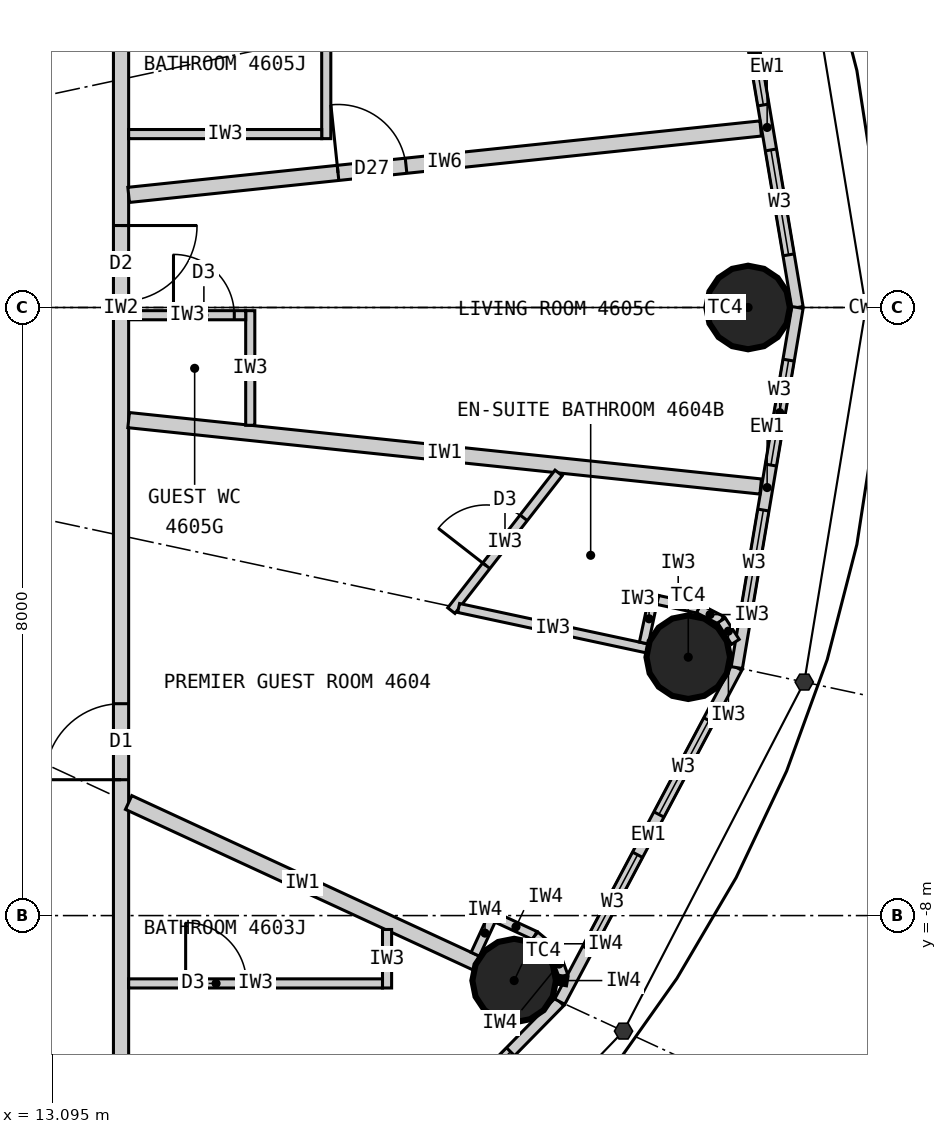
"""IFC4 building model, lengths in metres.
Left out: names, types, materials, properties, quantities, classifications, styles, units other than length and angle.
Written with IfcOpenShell. Run it as: python <this file> out.ifc"""

import sys

from ifc_helpers import new_model, si_unit, direction, frame, frame_2d, origin, origin_2d, place, context, subcontext, project, spatial, rectangle, circle, extrude, element, fill, save


model = new_model("IFC4")
c1 = context("Model", 3, precision=1e-05, world=origin(), true_north=direction((0.0, 1.0)))
c2 = subcontext(c1, "Body", "Model", "MODEL_VIEW")
j1 = project(units=[si_unit("LENGTHUNIT", "METRE"), si_unit("PLANEANGLEUNIT", "RADIAN")], contexts=[c1])
p1 = place(None, origin())
s1 = spatial("IfcSite", under=j1, at=p1, CompositionType="ELEMENT")
p2 = place(p1, origin())
s2 = spatial("IfcBuilding", under=s1, at=p2, CompositionType="ELEMENT")
p3 = place(p2, frame((0.0, 0.0, 173.1)))
s3 = spatial("IfcBuildingStorey", under=s2, at=p3, CompositionType="ELEMENT", Elevation=173.1)
for number, where, z_axis, x_axis in (
    (1, (22.25, 0.0, 0.0), (0.0, 0.0, 1.0), (1.0, 0.0, 0.0)),
    (2, (19.172, -8.855, 0.0), (0.0, 0.0, 1.0), (1.0, 0.0, 0.0)),
    (3, (21.463, -4.601, 0.0), (0.0, 0.0, 1.0), (1.0, 0.0, 0.0)),
):
    element("IfcColumn", number, at=place(p3, frame(where, z_axis=z_axis, x_axis=x_axis)), inside=s3, PredefinedType="COLUMN", context=c2, shape_type="SweptSolid", body=[
        extrude(circle(Radius=0.55, at=origin_2d()), origin(), (0.0, 0.0, 1.0), 3.3),
    ])
p4 = place(p3, frame((22.9, 0.0, 0.0), z_axis=(0.0, 0.0, 1.0), x_axis=(-0.166162111254, 0.986098449843, 0.0)))
e4 = element("IfcWall", 4, at=p4, inside=s3, PredefinedType="ELEMENTEDWALL", context=c2, shape_type="SweptSolid", body=[
    extrude(rectangle(XDim=4.805, YDim=0.15, at=frame_2d((2.402, 0.0))), origin(), (0.0, 0.0, 1.0), 3.12),
])
p5 = place(p4, frame((0.702, 0.0, 0.9)))
e5 = element("IfcOpeningElement", 5, at=p5, cuts=e4, PredefinedType="OPENING", context=c2, shape_type="SweptSolid", body=[
    extrude(rectangle(XDim=1.4, YDim=1.9, at=frame_2d((0.7, 0.95))), frame((0.0, 0.085, 0.0), z_axis=(0.0, -1.0, 0.0), x_axis=(1.0, 0.0, 0.0)), (0.0, 0.0, 1.0), 0.17),
])
p6 = place(p4, frame((2.702, 0.0, 0.9)))
e6 = element("IfcOpeningElement", 6, at=p6, cuts=e4, PredefinedType="OPENING", context=c2, shape_type="SweptSolid", body=[
    extrude(rectangle(XDim=1.4, YDim=1.9, at=frame_2d((0.7, 0.95))), frame((0.0, 0.085, 0.0), z_axis=(0.0, -1.0, 0.0), x_axis=(1.0, 0.0, 0.0)), (0.0, 0.0, 1.0), 0.17),
])
p7 = place(p3, frame((16.095, -12.876, 0.0), z_axis=(0.0, 0.0, 1.0), x_axis=(0.700727467776, 0.71342905457, 0.0)))
e7 = element("IfcWall", 7, at=p7, inside=s3, PredefinedType="ELEMENTEDWALL", context=c2, shape_type="SweptSolid", body=[
    extrude(rectangle(XDim=5.247, YDim=0.15, at=frame_2d((2.624, 0.0))), origin(), (0.0, 0.0, 1.0), 3.12),
])
p8 = place(p7, frame((0.924, 0.0, 0.9)))
e8 = element("IfcOpeningElement", 8, at=p8, cuts=e7, PredefinedType="OPENING", context=c2, shape_type="SweptSolid", body=[
    extrude(rectangle(XDim=1.4, YDim=1.9, at=frame_2d((0.7, 0.95))), frame((0.0, 0.085, 0.0), z_axis=(0.0, -1.0, 0.0), x_axis=(1.0, 0.0, 0.0)), (0.0, 0.0, 1.0), 0.17),
])
p9 = place(p7, frame((2.924, 0.0, 0.9)))
e9 = element("IfcOpeningElement", 9, at=p9, cuts=e7, PredefinedType="OPENING", context=c2, shape_type="SweptSolid", body=[
    extrude(rectangle(XDim=1.4, YDim=1.9, at=frame_2d((0.7, 0.95))), frame((0.0, 0.085, 0.0), z_axis=(0.0, -1.0, 0.0), x_axis=(1.0, 0.0, 0.0)), (0.0, 0.0, 1.0), 0.17),
])
p10 = place(p3, frame((19.772, -9.132, 0.0), z_axis=(0.0, 0.0, 1.0), x_axis=(0.468428906714, 0.883501193748, 0.0)))
e10 = element("IfcWall", 10, at=p10, inside=s3, PredefinedType="ELEMENTEDWALL", context=c2, shape_type="SweptSolid", body=[
    extrude(rectangle(XDim=4.974, YDim=0.15, at=frame_2d((2.487, 0.0))), origin(), (0.0, 0.0, 1.0), 3.12),
])
p11 = place(p10, frame((0.787, 0.0, 0.9)))
e11 = element("IfcOpeningElement", 11, at=p11, cuts=e10, PredefinedType="OPENING", context=c2, shape_type="SweptSolid", body=[
    extrude(rectangle(XDim=1.4, YDim=1.9, at=frame_2d((0.7, 0.95))), frame((0.0, 0.085, 0.0), z_axis=(0.0, -1.0, 0.0), x_axis=(1.0, 0.0, 0.0)), (0.0, 0.0, 1.0), 0.17),
])
p12 = place(p10, frame((2.787, 0.0, 0.9)))
e12 = element("IfcOpeningElement", 12, at=p12, cuts=e10, PredefinedType="OPENING", context=c2, shape_type="SweptSolid", body=[
    extrude(rectangle(XDim=1.4, YDim=1.9, at=frame_2d((0.7, 0.95))), frame((0.0, 0.085, 0.0), z_axis=(0.0, -1.0, 0.0), x_axis=(1.0, 0.0, 0.0)), (0.0, 0.0, 1.0), 0.17),
])
p13 = place(p3, frame((22.102, -4.738, 0.0), z_axis=(0.0, 0.0, 1.0), x_axis=(0.166162111254, 0.986098449843, 0.0)))
e13 = element("IfcWall", 13, at=p13, inside=s3, PredefinedType="ELEMENTEDWALL", context=c2, shape_type="SweptSolid", body=[
    extrude(rectangle(XDim=4.805, YDim=0.15, at=frame_2d((2.402, 0.0))), origin(), (0.0, 0.0, 1.0), 3.12),
])
p14 = place(p13, frame((0.702, 0.0, 0.9)))
e14 = element("IfcOpeningElement", 14, at=p14, cuts=e13, PredefinedType="OPENING", context=c2, shape_type="SweptSolid", body=[
    extrude(rectangle(XDim=1.4, YDim=1.9, at=frame_2d((0.7, 0.95))), frame((0.0, 0.085, 0.0), z_axis=(0.0, -1.0, 0.0), x_axis=(1.0, 0.0, 0.0)), (0.0, 0.0, 1.0), 0.17),
])
p15 = place(p13, frame((2.702, 0.0, 0.9)))
e15 = element("IfcOpeningElement", 15, at=p15, cuts=e13, PredefinedType="OPENING", context=c2, shape_type="SweptSolid", body=[
    extrude(rectangle(XDim=1.4, YDim=1.9, at=frame_2d((0.7, 0.95))), frame((0.0, 0.085, 0.0), z_axis=(0.0, -1.0, 0.0), x_axis=(1.0, 0.0, 0.0)), (0.0, 0.0, 1.0), 0.17),
])
p16 = place(p3, frame((14.0, -9.9, 0.0), z_axis=(0.0, 0.0, 1.0), x_axis=(0.0, 1.0, 0.0)))
e16 = element("IfcWall", 16, at=p16, inside=s3, PredefinedType="PARTITIONING", context=c2, shape_type="SweptSolid", body=[
    extrude(rectangle(XDim=19.8, YDim=0.2, at=frame_2d((9.9, 0.0))), origin(), (0.0, 0.0, 1.0), 3.12),
])
p17 = place(p16, frame((3.688, 0.0, 0.0)))
e17 = element("IfcOpeningElement", 17, at=p17, cuts=e16, PredefinedType="OPENING", context=c2, shape_type="SweptSolid", body=[
    extrude(rectangle(XDim=1.0, YDim=2.2, at=frame_2d((0.5, 1.1))), frame((0.0, 0.11, 0.0), z_axis=(0.0, -1.0, 0.0), x_axis=(1.0, 0.0, 0.0)), (0.0, 0.0, 1.0), 0.22),
])
p18 = place(p16, frame((9.979, 0.0, 0.0)))
e18 = element("IfcOpeningElement", 18, at=p18, cuts=e16, PredefinedType="OPENING", context=c2, shape_type="SweptSolid", body=[
    extrude(rectangle(XDim=1.0, YDim=2.2, at=frame_2d((0.5, 1.1))), frame((0.0, 0.11, 0.0), z_axis=(0.0, -1.0, 0.0), x_axis=(1.0, 0.0, 0.0)), (0.0, 0.0, 1.0), 0.22),
])
p19 = place(p16, frame((17.122, 0.0, 0.0)))
e19 = element("IfcOpeningElement", 19, at=p19, cuts=e16, PredefinedType="OPENING", context=c2, shape_type="SweptSolid", body=[
    extrude(rectangle(XDim=1.0, YDim=2.2, at=frame_2d((0.5, 1.1))), frame((0.0, 0.11, 0.0), z_axis=(0.0, -1.0, 0.0), x_axis=(1.0, 0.0, 0.0)), (0.0, 0.0, 1.0), 0.22),
])
p20 = place(p3, frame((14.1, 1.481, 0.0), z_axis=(0.0, 0.0, 1.0), x_axis=(0.994524794819, 0.104500873159, 0.0)))
e20 = element("IfcWall", 20, at=p20, inside=s3, PredefinedType="PARTITIONING", context=c2, shape_type="SweptSolid", body=[
    extrude(rectangle(XDim=8.362, YDim=0.2, at=frame_2d((4.181, 0.0))), origin(), (0.0, 0.0, 1.0), 2.47),
])
p21 = place(p20, frame((2.77, 0.0, 0.0)))
e21 = element("IfcOpeningElement", 21, at=p21, cuts=e20, PredefinedType="OPENING", context=c2, shape_type="SweptSolid", body=[
    extrude(rectangle(XDim=0.9, YDim=2.1, at=frame_2d((0.45, 1.05))), frame((0.0, 0.11, 0.0), z_axis=(0.0, -1.0, 0.0), x_axis=(1.0, 0.0, 0.0)), (0.0, 0.0, 1.0), 0.22),
])
p22 = place(p3, frame((14.1, -6.512, 0.0), z_axis=(0.0, 0.0, 1.0), x_axis=(0.907823150669, -0.419353224751, 0.0)))
e22 = element("IfcWall", 22, at=p22, inside=s3, PredefinedType="PARTITIONING", context=c2, shape_type="SweptSolid", body=[
    extrude(rectangle(XDim=5.037, YDim=0.2, at=frame_2d((2.519, 0.0))), origin(), (0.0, 0.0, 1.0), 2.32),
])
p23 = place(p3, frame((14.1, -1.481, 0.0), z_axis=(0.0, 0.0, 1.0), x_axis=(0.994524794819, -0.104500873159, 0.0)))
e23 = element("IfcWall", 23, at=p23, inside=s3, PredefinedType="PARTITIONING", context=c2, shape_type="SweptSolid", body=[
    extrude(rectangle(XDim=8.362, YDim=0.2, at=frame_2d((4.181, 0.0))), origin(), (0.0, 0.0, 1.0), 2.47),
])
p24 = place(p3, frame((17.5, -8.183, 0.0), z_axis=(0.0, 0.0, 1.0), x_axis=(0.0, -1.0, 0.0)))
e24 = element("IfcWall", 24, at=p24, inside=s3, PredefinedType="PARTITIONING", context=c2, shape_type="SweptSolid", body=[
    extrude(rectangle(XDim=0.77, YDim=0.12, at=frame_2d((0.385, 0.0))), origin(), (0.0, 0.0, 1.0), 3.12),
])
p25 = place(p3, frame((14.1, -8.893, 0.0), z_axis=(0.0, 0.0, 1.0), x_axis=(1.0, 0.0, 0.0)))
e25 = element("IfcWall", 25, at=p25, inside=s3, PredefinedType="PARTITIONING", context=c2, shape_type="SweptSolid", body=[
    extrude(rectangle(XDim=3.34, YDim=0.12, at=frame_2d((1.67, 0.0))), origin(), (0.0, 0.0, 1.0), 3.12),
])
p26 = place(p25, frame((0.75, 0.0, 0.0)))
e26 = element("IfcOpeningElement", 26, at=p26, cuts=e25, PredefinedType="OPENING", context=c2, shape_type="SweptSolid", body=[
    extrude(rectangle(XDim=0.8, YDim=2.1, at=frame_2d((0.4, 1.05))), frame((0.0, 0.07, 0.0), z_axis=(0.0, -1.0, 0.0), x_axis=(1.0, 0.0, 0.0)), (0.0, 0.0, 1.0), 0.14),
])
p27 = place(p3, frame((19.758, -2.177, 0.0), z_axis=(0.0, 0.0, 1.0), x_axis=(-0.614713147302, -0.788750750576, 0.0)))
e27 = element("IfcWall", 27, at=p27, inside=s3, PredefinedType="PARTITIONING", context=c2, shape_type="SweptSolid", body=[
    extrude(rectangle(XDim=2.296, YDim=0.12, at=frame_2d((1.148, 0.0))), origin(), (0.0, 0.0, 1.0), 3.12),
])
p28 = place(p27, frame((0.748, 0.0, 0.0)))
e28 = element("IfcOpeningElement", 28, at=p28, cuts=e27, PredefinedType="OPENING", context=c2, shape_type="SweptSolid", body=[
    extrude(rectangle(XDim=0.8, YDim=2.1, at=frame_2d((0.4, 1.05))), frame((0.0, 0.07, 0.0), z_axis=(0.0, -1.0, 0.0), x_axis=(1.0, 0.0, 0.0)), (0.0, 0.0, 1.0), 0.14),
])
p29 = place(p3, frame((18.441, -3.953, 0.0), z_axis=(0.0, 0.0, 1.0), x_axis=(0.977801007461, -0.209535652833, 0.0)))
e29 = element("IfcWall", 29, at=p29, inside=s3, PredefinedType="PARTITIONING", context=c2, shape_type="SweptSolid", body=[
    extrude(rectangle(XDim=2.54, YDim=0.12, at=frame_2d((1.27, 0.0))), origin(), (0.0, 0.0, 1.0), 2.42),
])
p30 = place(p3, frame((20.879, -4.414, 0.0), z_axis=(0.0, 0.0, 1.0), x_axis=(0.209554644104, 0.977796937577, 0.0)))
e30 = element("IfcWall", 30, at=p30, inside=s3, PredefinedType="PARTITIONING", context=c2, shape_type="SweptSolid", body=[
    extrude(rectangle(XDim=0.652, YDim=0.12, at=frame_2d((0.326, 0.0))), origin(), (0.0, 0.0, 1.0), 3.12),
])
p31 = place(p3, frame((21.062, -3.848, 0.0), z_axis=(0.0, 0.0, 1.0), x_axis=(0.977789415726, -0.209589738521, 0.0)))
e31 = element("IfcWall", 31, at=p31, inside=s3, PredefinedType="PARTITIONING", context=c2, shape_type="SweptSolid", body=[
    extrude(rectangle(XDim=0.55, YDim=0.12, at=frame_2d((0.275, 0.0))), origin(), (0.0, 0.0, 1.0), 3.12),
])
p32 = place(p3, frame((21.599, -3.963, 0.0), z_axis=(0.0, 0.0, 1.0), x_axis=(0.890193602875, -0.455582428766, 0.0)))
e32 = element("IfcWall", 32, at=p32, inside=s3, PredefinedType="PARTITIONING", context=c2, shape_type="SweptSolid", body=[
    extrude(rectangle(XDim=0.338, YDim=0.12, at=frame_2d((0.169, 0.0))), origin(), (0.0, 0.0, 1.0), 3.12),
])
p33 = place(p3, frame((21.9, -4.117, 0.0), z_axis=(0.0, 0.0, 1.0), x_axis=(0.543582688681, -0.839355622228, 0.0)))
e33 = element("IfcWall", 33, at=p33, inside=s3, PredefinedType="PARTITIONING", context=c2, shape_type="SweptSolid", body=[
    extrude(rectangle(XDim=0.336, YDim=0.12, at=frame_2d((0.168, 0.0))), origin(), (0.0, 0.0, 1.0), 3.12),
])
p34 = place(p3, frame((15.7, -1.55, 0.0), z_axis=(0.0, 0.0, 1.0), x_axis=(0.0, 1.0, 0.0)))
e34 = element("IfcWall", 34, at=p34, inside=s3, PredefinedType="PARTITIONING", context=c2, shape_type="SweptSolid", body=[
    extrude(rectangle(XDim=1.508, YDim=0.12, at=frame_2d((0.754, 0.0))), origin(), (0.0, 0.0, 1.0), 3.12),
])
p35 = place(p3, frame((14.1, -0.102, 0.0), z_axis=(0.0, 0.0, 1.0), x_axis=(1.0, 0.0, 0.0)))
e35 = element("IfcWall", 35, at=p35, inside=s3, PredefinedType="PARTITIONING", context=c2, shape_type="SweptSolid", body=[
    extrude(rectangle(XDim=1.54, YDim=0.12, at=frame_2d((0.77, 0.0))), origin(), (0.0, 0.0, 1.0), 2.42),
])
p36 = place(p35, frame((0.59, 0.0, 0.0)))
e36 = element("IfcOpeningElement", 36, at=p36, cuts=e35, PredefinedType="OPENING", context=c2, shape_type="SweptSolid", body=[
    extrude(rectangle(XDim=0.8, YDim=2.1, at=frame_2d((0.4, 1.05))), frame((0.0, 0.07, 0.0), z_axis=(0.0, -1.0, 0.0), x_axis=(1.0, 0.0, 0.0)), (0.0, 0.0, 1.0), 0.14),
])
p37 = place(p3, frame((16.7, 5.421, 0.0), z_axis=(0.0, 0.0, 1.0), x_axis=(0.0, -1.0, 0.0)))
e37 = element("IfcWall", 37, at=p37, inside=s3, PredefinedType="PARTITIONING", context=c2, shape_type="SweptSolid", body=[
    extrude(rectangle(XDim=3.2, YDim=0.12, at=frame_2d((1.6, 0.0))), origin(), (0.0, 0.0, 1.0), 3.12),
])
p38 = place(p37, frame((1.2, 0.0, 0.0)))
e38 = element("IfcOpeningElement", 38, at=p38, cuts=e37, PredefinedType="OPENING", context=c2, shape_type="SweptSolid", body=[
    extrude(rectangle(XDim=0.8, YDim=2.1, at=frame_2d((0.4, 1.05))), frame((0.0, 0.07, 0.0), z_axis=(0.0, -1.0, 0.0), x_axis=(1.0, 0.0, 0.0)), (0.0, 0.0, 1.0), 0.14),
])
p39 = place(p3, frame((14.1, 2.281, 0.0), z_axis=(0.0, 0.0, 1.0), x_axis=(1.0, 0.0, 0.0)))
e39 = element("IfcWall", 39, at=p39, inside=s3, PredefinedType="PARTITIONING", context=c2, shape_type="SweptSolid", body=[
    extrude(rectangle(XDim=2.54, YDim=0.12, at=frame_2d((1.27, 0.0))), origin(), (0.0, 0.0, 1.0), 3.12),
])
p40 = place(p3, frame((18.66, -8.509, 0.0), z_axis=(0.0, 0.0, 1.0), x_axis=(0.419083463716, 0.907947713494, 0.0)))
e40 = element("IfcWall", 40, at=p40, inside=s3, PredefinedType="PARTITIONING", context=c2, shape_type="SweptSolid", body=[
    extrude(rectangle(XDim=0.612, YDim=0.12, at=frame_2d((0.306, 0.0))), origin(), (0.0, 0.0, 1.0), 3.12),
])
p41 = place(p3, frame((18.946, -8.032, 0.0), z_axis=(0.0, 0.0, 1.0), x_axis=(0.907842467956, -0.419311403822, 0.0)))
e41 = element("IfcWall", 41, at=p41, inside=s3, PredefinedType="PARTITIONING", context=c2, shape_type="SweptSolid", body=[
    extrude(rectangle(XDim=0.55, YDim=0.12, at=frame_2d((0.275, 0.0))), origin(), (0.0, 0.0, 1.0), 3.12),
])
p42 = place(p3, frame((19.446, -8.263, 0.0), z_axis=(0.0, 0.0, 1.0), x_axis=(0.768221279597, -0.640184399664, 0.0)))
e42 = element("IfcWall", 42, at=p42, inside=s3, PredefinedType="PARTITIONING", context=c2, shape_type="SweptSolid", body=[
    extrude(rectangle(XDim=0.337, YDim=0.12, at=frame_2d((0.169, 0.0))), origin(), (0.0, 0.0, 1.0), 3.12),
])
p43 = place(p3, frame((19.705, -8.479, 0.0), z_axis=(0.0, 0.0, 1.0), x_axis=(0.345571344575, -0.938392479621, 0.0)))
e43 = element("IfcWall", 43, at=p43, inside=s3, PredefinedType="PARTITIONING", context=c2, shape_type="SweptSolid", body=[
    extrude(rectangle(XDim=0.338, YDim=0.12, at=frame_2d((0.169, 0.0))), origin(), (0.0, 0.0, 1.0), 3.12),
])
p44 = place(p3, frame((19.822, -8.796, 0.0), z_axis=(0.0, 0.0, 1.0), x_axis=(-0.169701508781, -0.985495508827, 0.0)))
e44 = element("IfcWall", 44, at=p44, inside=s3, PredefinedType="PARTITIONING", context=c2, shape_type="SweptSolid", body=[
    extrude(rectangle(XDim=0.119, YDim=0.12, at=frame_2d((0.06, 0.0))), origin(), (0.0, 0.0, 1.0), 3.12),
])
p45 = place(p5, origin())
e45 = element("IfcWindow", 45, at=p45, inside=s3, PartitioningType="SINGLE_PANEL", PredefinedType="WINDOW", context=c2, shape_type="SweptSolid", body=[
    extrude(rectangle(XDim=1.4, YDim=1.9, at=frame_2d((0.7, 0.95))), frame((0.0, 0.03, 0.0), z_axis=(0.0, -1.0, 0.0), x_axis=(1.0, 0.0, 0.0)), (0.0, 0.0, 1.0), 0.06),
])
fill(e5, e45)
p46 = place(p6, origin())
e46 = element("IfcWindow", 46, at=p46, inside=s3, PartitioningType="SINGLE_PANEL", PredefinedType="WINDOW", context=c2, shape_type="SweptSolid", body=[
    extrude(rectangle(XDim=1.4, YDim=1.9, at=frame_2d((0.7, 0.95))), frame((0.0, 0.03, 0.0), z_axis=(0.0, -1.0, 0.0), x_axis=(1.0, 0.0, 0.0)), (0.0, 0.0, 1.0), 0.06),
])
fill(e6, e46)
p47 = place(p9, origin())
e47 = element("IfcWindow", 47, at=p47, inside=s3, PartitioningType="SINGLE_PANEL", PredefinedType="WINDOW", context=c2, shape_type="SweptSolid", body=[
    extrude(rectangle(XDim=1.4, YDim=1.9, at=frame_2d((0.7, 0.95))), frame((0.0, 0.03, 0.0), z_axis=(0.0, -1.0, 0.0), x_axis=(1.0, 0.0, 0.0)), (0.0, 0.0, 1.0), 0.06),
])
fill(e9, e47)
p48 = place(p11, origin())
e48 = element("IfcWindow", 48, at=p48, inside=s3, PartitioningType="SINGLE_PANEL", PredefinedType="WINDOW", context=c2, shape_type="SweptSolid", body=[
    extrude(rectangle(XDim=1.4, YDim=1.9, at=frame_2d((0.7, 0.95))), frame((0.0, 0.03, 0.0), z_axis=(0.0, -1.0, 0.0), x_axis=(1.0, 0.0, 0.0)), (0.0, 0.0, 1.0), 0.06),
])
fill(e11, e48)
p49 = place(p12, origin())
e49 = element("IfcWindow", 49, at=p49, inside=s3, PartitioningType="SINGLE_PANEL", PredefinedType="WINDOW", context=c2, shape_type="SweptSolid", body=[
    extrude(rectangle(XDim=1.4, YDim=1.9, at=frame_2d((0.7, 0.95))), frame((0.0, 0.03, 0.0), z_axis=(0.0, -1.0, 0.0), x_axis=(1.0, 0.0, 0.0)), (0.0, 0.0, 1.0), 0.06),
])
fill(e12, e49)
p50 = place(p14, origin())
e50 = element("IfcWindow", 50, at=p50, inside=s3, PartitioningType="SINGLE_PANEL", PredefinedType="WINDOW", context=c2, shape_type="SweptSolid", body=[
    extrude(rectangle(XDim=1.4, YDim=1.9, at=frame_2d((0.7, 0.95))), frame((0.0, 0.03, 0.0), z_axis=(0.0, -1.0, 0.0), x_axis=(1.0, 0.0, 0.0)), (0.0, 0.0, 1.0), 0.06),
])
fill(e14, e50)
p51 = place(p15, origin())
e51 = element("IfcWindow", 51, at=p51, inside=s3, PartitioningType="SINGLE_PANEL", PredefinedType="WINDOW", context=c2, shape_type="SweptSolid", body=[
    extrude(rectangle(XDim=1.4, YDim=1.9, at=frame_2d((0.7, 0.95))), frame((0.0, 0.03, 0.0), z_axis=(0.0, -1.0, 0.0), x_axis=(1.0, 0.0, 0.0)), (0.0, 0.0, 1.0), 0.06),
])
fill(e15, e51)
p52 = place(p26, origin())
e52 = element("IfcDoor", 52, at=p52, inside=s3, OperationType="SINGLE_SWING_LEFT", PredefinedType="DOOR", context=c2, shape_type="SweptSolid", body=[
    extrude(rectangle(XDim=0.8, YDim=2.1, at=frame_2d((0.4, 1.05))), frame((0.0, 0.025, 0.0), z_axis=(0.0, -1.0, 0.0), x_axis=(1.0, 0.0, 0.0)), (0.0, 0.0, 1.0), 0.05),
])
fill(e26, e52)
p53 = place(p28, origin())
e53 = element("IfcDoor", 53, at=p53, inside=s3, OperationType="SINGLE_SWING_RIGHT", PredefinedType="DOOR", context=c2, shape_type="SweptSolid", body=[
    extrude(rectangle(XDim=0.8, YDim=2.1, at=frame_2d((0.4, 1.05))), frame((0.0, 0.025, 0.0), z_axis=(0.0, -1.0, 0.0), x_axis=(1.0, 0.0, 0.0)), (0.0, 0.0, 1.0), 0.05),
])
fill(e28, e53)
p54 = place(p17, origin())
e54 = element("IfcDoor", 54, at=p54, inside=s3, OperationType="SINGLE_SWING_LEFT", PredefinedType="DOOR", context=c2, shape_type="SweptSolid", body=[
    extrude(rectangle(XDim=1.0, YDim=2.2, at=frame_2d((0.5, 1.1))), frame((0.0, 0.025, 0.0), z_axis=(0.0, -1.0, 0.0), x_axis=(1.0, 0.0, 0.0)), (0.0, 0.0, 1.0), 0.05),
])
fill(e17, e54)
p55 = place(p36, origin())
e55 = element("IfcDoor", 55, at=p55, inside=s3, OperationType="SINGLE_SWING_LEFT", PredefinedType="DOOR", context=c2, shape_type="SweptSolid", body=[
    extrude(rectangle(XDim=0.8, YDim=2.1, at=frame_2d((0.4, 1.05))), frame((0.0, 0.025, 0.0), z_axis=(0.0, -1.0, 0.0), x_axis=(1.0, 0.0, 0.0)), (0.0, 0.0, 1.0), 0.05),
])
fill(e36, e55)
p56 = place(p18, origin())
e56 = element("IfcDoor", 56, at=p56, inside=s3, OperationType="SINGLE_SWING_RIGHT", PredefinedType="DOOR", context=c2, shape_type="SweptSolid", body=[
    extrude(rectangle(XDim=1.0, YDim=2.2, at=frame_2d((0.5, 1.1))), frame((0.0, 0.025, 0.0), z_axis=(0.0, -1.0, 0.0), x_axis=(1.0, 0.0, 0.0)), (0.0, 0.0, 1.0), 0.05),
])
fill(e18, e56)
p57 = place(p21, origin())
e57 = element("IfcDoor", 57, at=p57, inside=s3, OperationType="SINGLE_SWING_LEFT", PredefinedType="DOOR", context=c2, shape_type="SweptSolid", body=[
    extrude(rectangle(XDim=0.9, YDim=2.1, at=frame_2d((0.45, 1.05))), frame((0.0, 0.025, 0.0), z_axis=(0.0, -1.0, 0.0), x_axis=(1.0, 0.0, 0.0)), (0.0, 0.0, 1.0), 0.05),
])
fill(e21, e57)
save(model, sys.argv[1])
